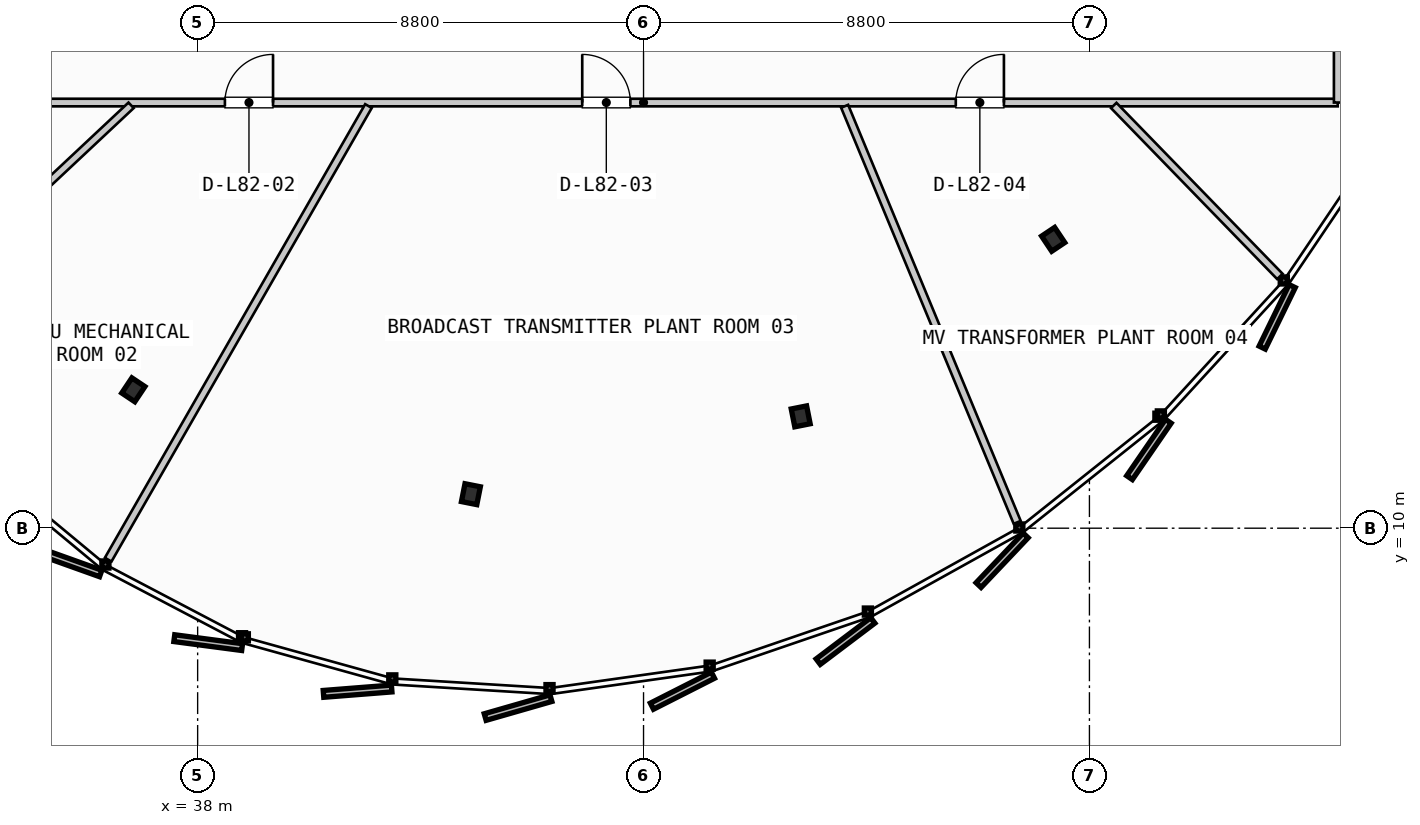
"""IFC4 building model, lengths in metres.
Left out: names, types, materials, properties, quantities, classifications, styles, units other than length and angle.
Written with IfcOpenShell. Run it as: python <this file> out.ifc"""

import sys

from ifc_helpers import new_model, si_unit, direction, frame, frame_2d, origin, origin_2d, place, context, subcontext, project, spatial, rectangle, i_section, extrude, source, transform, mapped, element, fill, save


model = new_model("IFC4")
c1 = context("Model", 3, precision=1e-05, world=origin(), true_north=direction((0.0, 1.0)))
c2 = subcontext(c1, "Body", "Model", "MODEL_VIEW")
j1 = project(units=[si_unit("LENGTHUNIT", "METRE"), si_unit("PLANEANGLEUNIT", "RADIAN")], contexts=[c1])
p1 = place(None, origin())
s1 = spatial("IfcSite", under=j1, at=p1, CompositionType="ELEMENT")
p2 = place(p1, origin())
s2 = spatial("IfcBuilding", under=s1, at=p2, CompositionType="ELEMENT")
p3 = place(p2, frame((0.0, 0.0, 308.3)))
s3 = spatial("IfcBuildingStorey", under=s2, at=p3, CompositionType="ELEMENT", Elevation=308.3)
m1 = source(origin(), c2, "Body", "SweptSolid", [
    extrude(i_section(OverallWidth=0.309, OverallDepth=0.359, WebThickness=0.016, FlangeThickness=0.026, FilletRadius=0.027, at=origin_2d()), origin(), (0.0, 0.0, 1.0), 3.735),
])
for number, where, z_axis, x_axis in (
    (1, (36.731, 12.731, 0.0), (0.0, 0.0, 1.0), (-0.556, -0.831, 0.0)),
    (2, (43.393, 10.671, 0.0), (0.0, 0.0, 1.0), (-0.195, -0.981, 0.0)),
    (3, (49.902, 12.207, 0.0), (0.0, 0.0, 1.0), (0.195, -0.981, 0.0)),
    (4, (54.885, 15.7, 0.0), (0.0, 0.0, 1.0), (0.556, -0.831, 0.0)),
):
    element("IfcColumn", number, at=place(p3, frame(where, z_axis=z_axis, x_axis=x_axis)), inside=s3, PredefinedType="COLUMN", context=c2, shape_type="MappedRepresentation", body=[
        mapped(m1, transform((0.0, 0.0, 0.0), scale=1.0)),
    ])
p4 = place(p3, frame((33.1, 18.4, 0.0), z_axis=(0.0, 0.0, 1.0), x_axis=(1.0, 0.0, 0.0)))
e5 = element("IfcWall", 5, at=p4, inside=s3, PredefinedType="PARTITIONING", context=c2, shape_type="SweptSolid", body=[
    extrude(rectangle(XDim=27.4, YDim=0.15, at=frame_2d((13.7, 0.0))), origin(), (0.0, 0.0, 1.0), 3.26),
])
p5 = place(p4, frame((5.438, 0.0, 0.0)))
e6 = element("IfcOpeningElement", 6, at=p5, cuts=e5, PredefinedType="OPENING", context=c2, shape_type="SweptSolid", body=[
    extrude(rectangle(XDim=0.95, YDim=2.15, at=frame_2d((0.475, 1.075))), frame((0.0, 0.085, 0.0), z_axis=(0.0, -1.0, 0.0), x_axis=(1.0, 0.0, 0.0)), (0.0, 0.0, 1.0), 0.17),
])
p6 = place(p4, frame((12.49, 0.0, 0.0)))
e7 = element("IfcOpeningElement", 7, at=p6, cuts=e5, PredefinedType="OPENING", context=c2, shape_type="SweptSolid", body=[
    extrude(rectangle(XDim=0.95, YDim=2.15, at=frame_2d((0.475, 1.075))), frame((0.0, 0.085, 0.0), z_axis=(0.0, -1.0, 0.0), x_axis=(1.0, 0.0, 0.0)), (0.0, 0.0, 1.0), 0.17),
])
p7 = place(p4, frame((19.863, 0.0, 0.0)))
e8 = element("IfcOpeningElement", 8, at=p7, cuts=e5, PredefinedType="OPENING", context=c2, shape_type="SweptSolid", body=[
    extrude(rectangle(XDim=0.95, YDim=2.15, at=frame_2d((0.475, 1.075))), frame((0.0, 0.085, 0.0), z_axis=(0.0, -1.0, 0.0), x_axis=(1.0, 0.0, 0.0)), (0.0, 0.0, 1.0), 0.17),
])
p8 = place(p3, frame((60.5, 18.4, 0.0), z_axis=(0.0, 0.0, 1.0), x_axis=(0.0, 1.0, 0.0)))
e9 = element("IfcWall", 9, at=p8, inside=s3, PredefinedType="PARTITIONING", context=c2, shape_type="SweptSolid", body=[
    extrude(rectangle(XDim=18.8, YDim=0.15, at=frame_2d((9.4, 0.0))), origin(), (0.0, 0.0, 1.0), 3.26),
])
p9 = place(p8, frame((4.433, 0.0, 0.0)))
e10 = element("IfcOpeningElement", 10, at=p9, cuts=e9, PredefinedType="OPENING", context=c2, shape_type="SweptSolid", body=[
    extrude(rectangle(XDim=0.95, YDim=2.15, at=frame_2d((0.475, 1.075))), frame((0.0, 0.085, 0.0), z_axis=(0.0, -1.0, 0.0), x_axis=(1.0, 0.0, 0.0)), (0.0, 0.0, 1.0), 0.17),
])
p10 = place(p8, frame((13.672, 0.0, 0.0)))
e11 = element("IfcOpeningElement", 11, at=p10, cuts=e9, PredefinedType="OPENING", context=c2, shape_type="SweptSolid", body=[
    extrude(rectangle(XDim=0.95, YDim=2.15, at=frame_2d((0.475, 1.075))), frame((0.0, 0.085, 0.0), z_axis=(0.0, -1.0, 0.0), x_axis=(1.0, 0.0, 0.0)), (0.0, 0.0, 1.0), 0.17),
])
p11 = place(p3, frame((36.687, 18.345, 0.0), z_axis=(0.0, 0.0, 1.0), x_axis=(-0.729594919554, -0.683879560566, 0.0)))
e12 = element("IfcWall", 12, at=p11, inside=s3, PredefinedType="PARTITIONING", context=c2, shape_type="SweptSolid", body=[
    extrude(rectangle(XDim=6.595, YDim=0.15, at=frame_2d((3.298, 0.0))), origin(), (0.0, 0.0, 1.0), 3.26),
])
p12 = place(p3, frame((41.371, 18.331, 0.0), z_axis=(0.0, 0.0, 1.0), x_axis=(-0.497725179065, -0.867334794716, 0.0)))
e13 = element("IfcWall", 13, at=p12, inside=s3, PredefinedType="PARTITIONING", context=c2, shape_type="SweptSolid", body=[
    extrude(rectangle(XDim=10.321, YDim=0.15, at=frame_2d((5.16, 0.0))), origin(), (0.0, 0.0, 1.0), 3.26),
])
p13 = place(p3, frame((50.769, 18.326, 0.0), z_axis=(0.0, 0.0, 1.0), x_axis=(0.383109335805, -0.923703002495, 0.0)))
e14 = element("IfcWall", 14, at=p13, inside=s3, PredefinedType="PARTITIONING", context=c2, shape_type="SweptSolid", body=[
    extrude(rectangle(XDim=8.889, YDim=0.15, at=frame_2d((4.445, 0.0))), origin(), (0.0, 0.0, 1.0), 3.26),
])
p14 = place(p3, frame((56.08, 18.343, 0.0), z_axis=(0.0, 0.0, 1.0), x_axis=(0.69689016939, -0.717177866228, 0.0)))
e15 = element("IfcWall", 15, at=p14, inside=s3, PredefinedType="PARTITIONING", context=c2, shape_type="SweptSolid", body=[
    extrude(rectangle(XDim=4.705, YDim=0.15, at=frame_2d((2.353, 0.0))), origin(), (0.0, 0.0, 1.0), 3.26),
])
m2 = source(origin(), c2, "Body", "SweptSolid", [
    extrude(rectangle(XDim=0.95, YDim=2.15, at=frame_2d((0.475, 1.075))), frame((0.0, 0.025, 0.0), z_axis=(0.0, -1.0, 0.0), x_axis=(1.0, 0.0, 0.0)), (0.0, 0.0, 1.0), 0.05),
])
p15 = place(p5, origin())
e16 = element("IfcDoor", 16, at=p15, inside=s3, OperationType="SINGLE_SWING_RIGHT", PredefinedType="DOOR", context=c2, shape_type="MappedRepresentation", body=[
    mapped(m2, transform((0.0, 0.0, 0.0), scale=1.0)),
])
fill(e6, e16)
p16 = place(p6, origin())
e17 = element("IfcDoor", 17, at=p16, inside=s3, OperationType="SINGLE_SWING_LEFT", PredefinedType="DOOR", context=c2, shape_type="MappedRepresentation", body=[
    mapped(m2, transform((0.0, 0.0, 0.0), scale=1.0)),
])
fill(e7, e17)
p17 = place(p7, origin())
e18 = element("IfcDoor", 18, at=p17, inside=s3, OperationType="SINGLE_SWING_RIGHT", PredefinedType="DOOR", context=c2, shape_type="MappedRepresentation", body=[
    mapped(m2, transform((0.0, 0.0, 0.0), scale=1.0)),
])
fill(e8, e18)
save(model, sys.argv[1])
